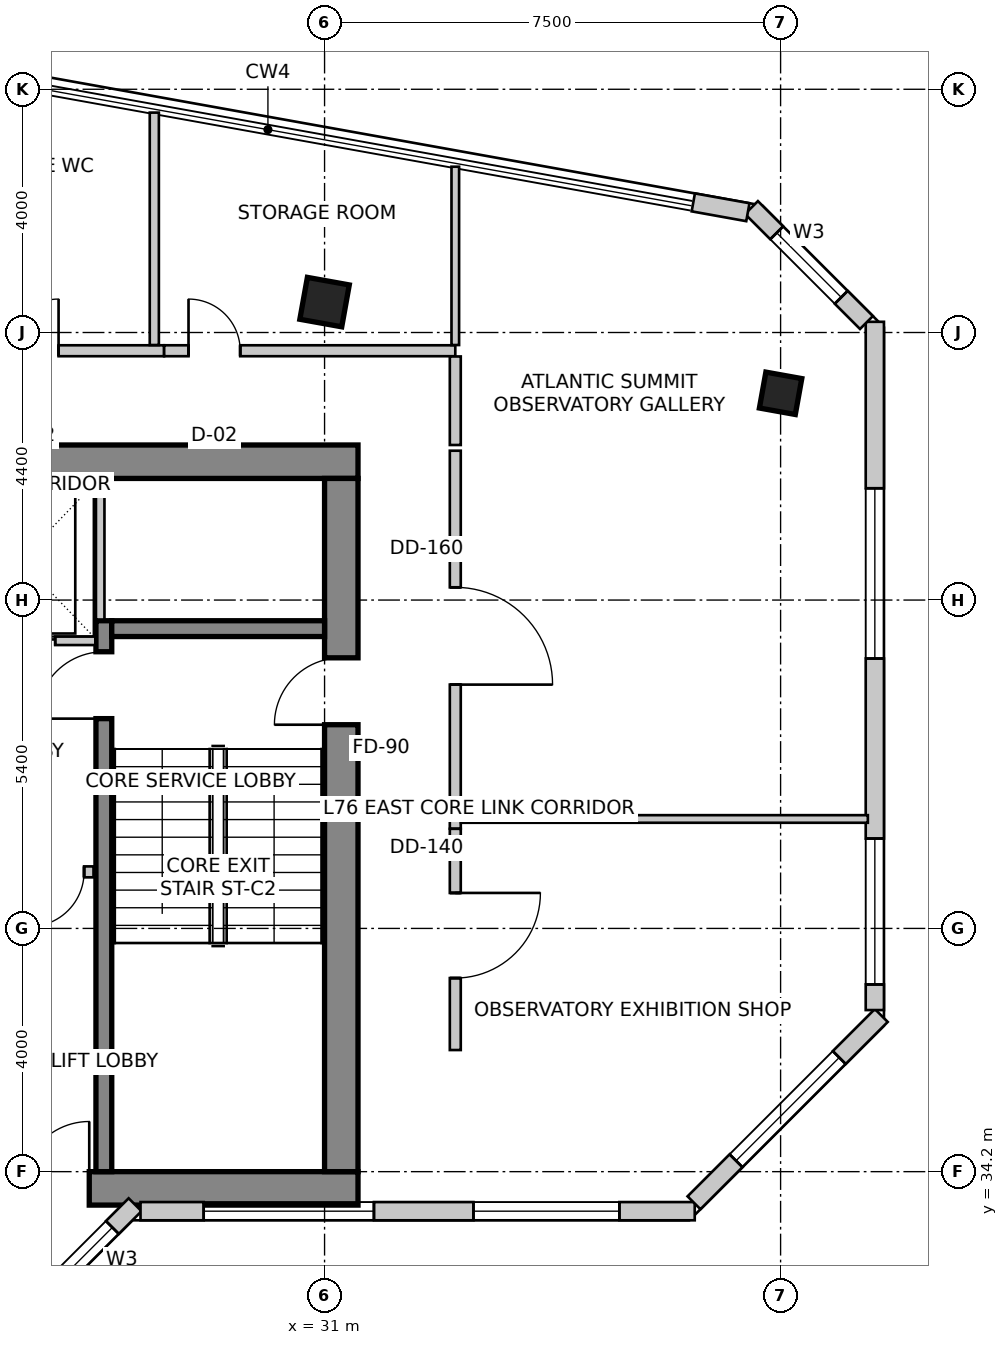
"""IFC4 building model, lengths in metres.
Left out: names, types, materials, properties, quantities, classifications, styles, units other than length and angle.
Written with IfcOpenShell. Run it as: python <this file> out.ifc"""

import sys

from ifc_helpers import new_model, si_unit, direction, frame, frame_2d, origin, origin_2d, place, context, subcontext, project, spatial, rectangle, extrude, source, transform, mapped, element, fill, save


model = new_model("IFC4")
c1 = context("Model", 3, precision=1e-05, world=origin(), true_north=direction((0.0, 1.0)))
c2 = subcontext(c1, "Body", "Model", "MODEL_VIEW")
j1 = project(units=[si_unit("LENGTHUNIT", "METRE"), si_unit("PLANEANGLEUNIT", "RADIAN")], contexts=[c1])
p1 = place(None, origin())
s1 = spatial("IfcSite", under=j1, at=p1, CompositionType="ELEMENT")
p2 = place(p1, origin())
s2 = spatial("IfcBuilding", under=s1, at=p2, CompositionType="ELEMENT")
p3 = place(p2, frame((0.0, 0.0, 296.5)))
s3 = spatial("IfcBuildingStorey", under=s2, at=p3, CompositionType="ELEMENT", Elevation=296.5)
p4 = place(p3, frame((16.05, 45.875, 0.0), z_axis=(0.0, 0.0, 1.0), x_axis=(1.0, 0.0, 0.0)))
e1 = element("IfcWall", 1, at=p4, inside=s3, PredefinedType="SHEAR", context=c2, shape_type="SweptSolid", body=[
    extrude(rectangle(XDim=15.5, YDim=0.55, at=frame_2d((7.75, 0.0))), origin(), (0.0, 0.0, 1.0), 4.0),
])
p5 = place(p3, frame((16.05, 33.925, 0.0), z_axis=(0.0, 0.0, 1.0), x_axis=(1.0, 0.0, 0.0)))
e2 = element("IfcWall", 2, at=p5, inside=s3, PredefinedType="SHEAR", context=c2, shape_type="SweptSolid", body=[
    extrude(rectangle(XDim=15.5, YDim=0.55, at=frame_2d((7.75, 0.0))), origin(), (0.0, 0.0, 1.0), 4.0),
])
m1 = source(origin(), c2, "Body", "SweptSolid", [
    extrude(rectangle(XDim=1.1, YDim=2.15, at=frame_2d((0.55, 1.075))), frame((0.0, 0.285, 0.0), z_axis=(0.0, -1.0, 0.0), x_axis=(1.0, 0.0, 0.0)), (0.0, 0.0, 1.0), 0.57),
])
p6 = place(p5, frame((9.98, 0.0, 0.0)))
e3 = element("IfcOpeningElement", 3, at=p6, cuts=e2, PredefinedType="OPENING", context=c2, shape_type="MappedRepresentation", body=[
    mapped(m1, transform((0.0, 0.0, 0.0), scale=1.0)),
])
p7 = place(p3, frame((31.275, 34.2, 0.0), z_axis=(0.0, 0.0, 1.0), x_axis=(0.0, 1.0, 0.0)))
e4 = element("IfcWall", 4, at=p7, inside=s3, PredefinedType="SHEAR", context=c2, shape_type="SweptSolid", body=[
    extrude(rectangle(XDim=11.4, YDim=0.55, at=frame_2d((5.7, 0.0))), origin(), (0.0, 0.0, 1.0), 4.0),
])
p8 = place(p7, frame((7.35, 0.0, 0.0)))
e5 = element("IfcOpeningElement", 5, at=p8, cuts=e4, PredefinedType="OPENING", context=c2, shape_type="MappedRepresentation", body=[
    mapped(m1, transform((0.0, 0.0, 0.0), scale=1.0)),
])
p9 = place(p3, frame((27.37, 34.2, 0.0), z_axis=(0.0, 0.0, 1.0), x_axis=(0.0, 1.0, 0.0)))
e6 = element("IfcWall", 6, at=p9, inside=s3, PredefinedType="SHEAR", context=c2, shape_type="SweptSolid", body=[
    extrude(rectangle(XDim=9.06, YDim=0.26, at=frame_2d((4.53, 0.0))), origin(), (0.0, 0.0, 1.0), 4.0),
])
m2 = source(origin(), c2, "Body", "SweptSolid", [
    extrude(rectangle(XDim=1.1, YDim=2.15, at=frame_2d((0.55, 1.075))), frame((0.0, 0.14, 0.0), z_axis=(0.0, -1.0, 0.0), x_axis=(1.0, 0.0, 0.0)), (0.0, 0.0, 1.0), 0.28),
])
p10 = place(p9, frame((7.45, 0.0, 0.0)))
e7 = element("IfcOpeningElement", 7, at=p10, cuts=e6, PredefinedType="OPENING", context=c2, shape_type="MappedRepresentation", body=[
    mapped(m2, transform((0.0, 0.0, 0.0), scale=1.0)),
])
p11 = place(p3, frame((27.5, 43.13, 0.0), z_axis=(0.0, 0.0, 1.0), x_axis=(1.0, 0.0, 0.0)))
e8 = element("IfcWall", 8, at=p11, inside=s3, PredefinedType="SHEAR", context=c2, shape_type="SweptSolid", body=[
    extrude(rectangle(XDim=3.5, YDim=0.26, at=frame_2d((1.75, 0.0))), origin(), (0.0, 0.0, 1.0), 4.0),
])
m3 = source(origin(), c2, "Body", "SweptSolid", [
    extrude(rectangle(XDim=0.7, YDim=0.7, at=origin_2d()), origin(), (0.0, 0.0, 1.0), 4.0),
])
p12 = place(p3, frame((31.0, 48.5, 0.0), z_axis=(0.0, 0.0, 1.0), x_axis=(0.984195607969, -0.17708474032, 0.0)))
e9 = element("IfcColumn", 9, at=p12, inside=s3, PredefinedType="COLUMN", context=c2, shape_type="MappedRepresentation", body=[
    mapped(m3, transform((0.0, 0.0, 0.0), scale=1.0)),
])
m4 = source(origin(), c2, "Body", "SweptSolid", [
    extrude(rectangle(XDim=0.6, YDim=0.6, at=origin_2d()), origin(), (0.0, 0.0, 1.0), 4.0),
])
p13 = place(p3, frame((38.5, 47.0, 0.0), z_axis=(0.0, 0.0, 1.0), x_axis=(0.984195607969, -0.17708474032, 0.0)))
e10 = element("IfcColumn", 10, at=p13, inside=s3, PredefinedType="COLUMN", context=c2, shape_type="MappedRepresentation", body=[
    mapped(m4, transform((0.0, 0.0, 0.0), scale=1.0)),
])
p14 = place(p3, frame((25.828, 31.6, 0.0), z_axis=(0.0, 0.0, 1.0), x_axis=(0.707106781187, 0.707106781187, 0.0)))
e11 = element("IfcWall", 11, at=p14, inside=s3, PredefinedType="SOLIDWALL", context=c2, shape_type="SweptSolid", body=[
    extrude(rectangle(XDim=2.907, YDim=0.3, at=frame_2d((1.454, 0.0))), origin(), (0.0, 0.0, 1.0), 3.75),
])
m5 = source(origin(), c2, "Body", "SweptSolid", [
    extrude(rectangle(XDim=1.5, YDim=1.8, at=frame_2d((0.75, 0.9))), frame((0.0, 0.16, 0.0), z_axis=(0.0, -1.0, 0.0), x_axis=(1.0, 0.0, 0.0)), (0.0, 0.0, 1.0), 0.32),
])
p15 = place(p14, frame((0.879, 0.0, 0.85)))
e12 = element("IfcOpeningElement", 12, at=p15, cuts=e11, PredefinedType="OPENING", context=c2, shape_type="MappedRepresentation", body=[
    mapped(m5, transform((0.0, 0.0, 0.0), scale=1.0)),
])
p16 = place(p3, frame((27.973, 33.55, 0.0), z_axis=(0.0, 0.0, 1.0), x_axis=(1.0, 0.0, 0.0)))
e13 = element("IfcWall", 13, at=p16, inside=s3, PredefinedType="SOLIDWALL", context=c2, shape_type="SweptSolid", body=[
    extrude(rectangle(XDim=9.115, YDim=0.3, at=frame_2d((4.558, 0.0))), origin(), (0.0, 0.0, 1.0), 3.75),
])
m6 = source(origin(), c2, "Body", "SweptSolid", [
    extrude(rectangle(XDim=2.8, YDim=2.4, at=frame_2d((1.4, 1.2))), frame((0.0, 0.16, 0.0), z_axis=(0.0, -1.0, 0.0), x_axis=(1.0, 0.0, 0.0)), (0.0, 0.0, 1.0), 0.32),
])
p17 = place(p16, frame((1.039, 0.0, 0.85)))
e14 = element("IfcOpeningElement", 14, at=p17, cuts=e13, PredefinedType="OPENING", context=c2, shape_type="MappedRepresentation", body=[
    mapped(m6, transform((0.0, 0.0, 0.0), scale=1.0)),
])
m7 = source(origin(), c2, "Body", "SweptSolid", [
    extrude(rectangle(XDim=2.4, YDim=2.2, at=frame_2d((1.2, 1.1))), frame((0.0, 0.16, 0.0), z_axis=(0.0, -1.0, 0.0), x_axis=(1.0, 0.0, 0.0)), (0.0, 0.0, 1.0), 0.32),
])
p18 = place(p16, frame((5.476, 0.0, 0.85)))
e15 = element("IfcOpeningElement", 15, at=p18, cuts=e13, PredefinedType="OPENING", context=c2, shape_type="MappedRepresentation", body=[
    mapped(m7, transform((0.0, 0.0, 0.0), scale=1.0)),
])
p19 = place(p3, frame((37.076, 33.688, 0.0), z_axis=(0.0, 0.0, 1.0), x_axis=(0.707078757535, 0.707134803727, 0.0)))
e16 = element("IfcWall", 16, at=p19, inside=s3, PredefinedType="SOLIDWALL", context=c2, shape_type="SweptSolid", body=[
    extrude(rectangle(XDim=4.356, YDim=0.3, at=frame_2d((2.178, 0.0))), origin(), (0.0, 0.0, 1.0), 3.75),
])
p20 = place(p19, frame((0.978, 0.0, 0.85)))
e17 = element("IfcOpeningElement", 17, at=p20, cuts=e16, PredefinedType="OPENING", context=c2, shape_type="MappedRepresentation", body=[
    mapped(m7, transform((0.0, 0.0, 0.0), scale=1.0)),
])
p21 = place(p3, frame((40.05, 36.857, 0.0), z_axis=(0.0, 0.0, 1.0), x_axis=(0.0, 1.0, 0.0)))
e18 = element("IfcWall", 18, at=p21, inside=s3, PredefinedType="SOLIDWALL", context=c2, shape_type="SweptSolid", body=[
    extrude(rectangle(XDim=11.318, YDim=0.3, at=frame_2d((5.659, 0.0))), origin(), (0.0, 0.0, 1.0), 3.75),
])
p22 = place(p21, frame((0.421, 0.0, 0.85)))
e19 = element("IfcOpeningElement", 19, at=p22, cuts=e18, PredefinedType="OPENING", context=c2, shape_type="MappedRepresentation", body=[
    mapped(m7, transform((0.0, 0.0, 0.0), scale=1.0)),
])
p23 = place(p21, frame((5.781, 0.0, 0.85)))
e20 = element("IfcOpeningElement", 20, at=p23, cuts=e18, PredefinedType="OPENING", context=c2, shape_type="MappedRepresentation", body=[
    mapped(m6, transform((0.0, 0.0, 0.0), scale=1.0)),
])
p24 = place(p3, frame((39.912, 48.164, 0.0), z_axis=(0.0, 0.0, 1.0), x_axis=(-0.70715242601, 0.707061133417, 0.0)))
e21 = element("IfcWall", 21, at=p24, inside=s3, PredefinedType="SOLIDWALL", context=c2, shape_type="SweptSolid", body=[
    extrude(rectangle(XDim=2.674, YDim=0.3, at=frame_2d((1.337, 0.0))), origin(), (0.0, 0.0, 1.0), 3.75),
])
p25 = place(p24, frame((0.587, 0.0, 0.85)))
e22 = element("IfcOpeningElement", 22, at=p25, cuts=e21, PredefinedType="OPENING", context=c2, shape_type="MappedRepresentation", body=[
    mapped(m5, transform((0.0, 0.0, 0.0), scale=1.0)),
])
p26 = place(p3, frame((37.962, 49.979, 0.0), z_axis=(0.0, 0.0, 1.0), x_axis=(-0.984215051171, 0.176976645491, 0.0)))
e23 = element("IfcWall", 23, at=p26, inside=s3, PredefinedType="SOLIDWALL", context=c2, shape_type="SweptSolid", body=[
    extrude(rectangle(XDim=0.912, YDim=0.3, at=frame_2d((0.456, 0.0))), origin(), (0.0, 0.0, 1.0), 3.75),
])
p27 = place(p3, frame((20.37, 42.93, 0.0), z_axis=(0.0, 0.0, 1.0), x_axis=(1.0, 0.0, 0.0)))
e24 = element("IfcWall", 24, at=p27, inside=s3, PredefinedType="SOLIDWALL", context=c2, shape_type="SweptSolid", body=[
    extrude(rectangle(XDim=6.86, YDim=0.14, at=frame_2d((3.43, 0.0))), origin(), (0.0, 0.0, 1.0), 3.75),
])
m8 = source(origin(), c2, "Body", "SweptSolid", [
    extrude(rectangle(XDim=1.1, YDim=2.15, at=frame_2d((0.55, 1.075))), frame((0.0, 0.08, 0.0), z_axis=(0.0, -1.0, 0.0), x_axis=(1.0, 0.0, 0.0)), (0.0, 0.0, 1.0), 0.16),
])
p28 = place(p27, frame((0.5, 0.0, 0.0)))
e25 = element("IfcOpeningElement", 25, at=p28, cuts=e24, PredefinedType="OPENING", context=c2, shape_type="MappedRepresentation", body=[
    mapped(m8, transform((0.0, 0.0, 0.0), scale=1.0)),
])
p29 = place(p27, frame((2.7, 0.0, 0.0)))
e26 = element("IfcOpeningElement", 26, at=p29, cuts=e24, PredefinedType="OPENING", context=c2, shape_type="MappedRepresentation", body=[
    mapped(m8, transform((0.0, 0.0, 0.0), scale=1.0)),
])
p30 = place(p27, frame((5.1, 0.0, 0.0)))
e27 = element("IfcOpeningElement", 27, at=p30, cuts=e24, PredefinedType="OPENING", context=c2, shape_type="MappedRepresentation", body=[
    mapped(m8, transform((0.0, 0.0, 0.0), scale=1.0)),
])
p31 = place(p3, frame((27.31, 43.28, 0.0), z_axis=(0.0, 0.0, 1.0), x_axis=(0.0, 1.0, 0.0)))
e28 = element("IfcWall", 28, at=p31, inside=s3, PredefinedType="SOLIDWALL", context=c2, shape_type="SweptSolid", body=[
    extrude(rectangle(XDim=2.3, YDim=0.14, at=frame_2d((1.15, 0.0))), origin(), (0.0, 0.0, 1.0), 3.75),
])
p32 = place(p3, frame((27.2, 39.13, 0.0), z_axis=(0.0, 0.0, 1.0), x_axis=(-1.0, 0.0, 0.0)))
e29 = element("IfcWall", 29, at=p32, inside=s3, PredefinedType="PARTITIONING", context=c2, shape_type="SweptSolid", body=[
    extrude(rectangle(XDim=1.21, YDim=0.18, at=frame_2d((0.605, 0.0))), origin(), (0.0, 0.0, 1.0), 3.75),
])
m9 = source(origin(), c2, "Body", "SweptSolid", [
    extrude(rectangle(XDim=0.9, YDim=2.15, at=frame_2d((0.45, 1.075))), frame((0.0, 0.1, 0.0), z_axis=(0.0, -1.0, 0.0), x_axis=(1.0, 0.0, 0.0)), (0.0, 0.0, 1.0), 0.2),
])
p33 = place(p32, frame((0.155, 0.0, 0.0)))
e30 = element("IfcOpeningElement", 30, at=p33, cuts=e29, PredefinedType="OPENING", context=c2, shape_type="MappedRepresentation", body=[
    mapped(m9, transform((0.0, 0.0, 0.0), scale=1.0)),
])
p34 = place(p3, frame((24.162, 47.7, 0.0), z_axis=(0.0, 0.0, 1.0), x_axis=(1.0, 0.0, 0.0)))
e31 = element("IfcWall", 31, at=p34, inside=s3, PredefinedType="PARTITIONING", context=c2, shape_type="SweptSolid", body=[
    extrude(rectangle(XDim=4.198, YDim=0.18, at=frame_2d((2.099, 0.0))), origin(), (0.0, 0.0, 1.0), 3.75),
])
m10 = source(origin(), c2, "Body", "SweptSolid", [
    extrude(rectangle(XDim=0.85, YDim=2.15, at=frame_2d((0.425, 1.075))), frame((0.0, 0.1, 0.0), z_axis=(0.0, -1.0, 0.0), x_axis=(1.0, 0.0, 0.0)), (0.0, 0.0, 1.0), 0.2),
])
p35 = place(p34, frame((1.613, 0.0, 0.0)))
e32 = element("IfcOpeningElement", 32, at=p35, cuts=e31, PredefinedType="OPENING", context=c2, shape_type="MappedRepresentation", body=[
    mapped(m10, transform((0.0, 0.0, 0.0), scale=1.0)),
])
p36 = place(p3, frame((28.362, 47.7, 0.0), z_axis=(0.0, 0.0, 1.0), x_axis=(1.0, 0.0, 0.0)))
e33 = element("IfcWall", 33, at=p36, inside=s3, PredefinedType="PARTITIONING", context=c2, shape_type="SweptSolid", body=[
    extrude(rectangle(XDim=4.788, YDim=0.18, at=frame_2d((2.394, 0.0))), origin(), (0.0, 0.0, 1.0), 3.279),
])
p37 = place(p36, frame((0.401, 0.0, 0.0)))
e34 = element("IfcOpeningElement", 34, at=p37, cuts=e33, PredefinedType="OPENING", context=c2, shape_type="MappedRepresentation", body=[
    mapped(m10, transform((0.0, 0.0, 0.0), scale=1.0)),
])
p38 = place(p3, frame((33.15, 47.606, 0.0), z_axis=(0.0, 0.0, 1.0), x_axis=(0.0, -1.0, 0.0)))
e35 = element("IfcWall", 35, at=p38, inside=s3, PredefinedType="PARTITIONING", context=c2, shape_type="SweptSolid", body=[
    extrude(rectangle(XDim=1.456, YDim=0.18, at=frame_2d((0.728, 0.0))), origin(), (0.0, 0.0, 1.0), 3.75),
])
p39 = place(p3, frame((33.15, 46.056, 0.0), z_axis=(0.0, 0.0, 1.0), x_axis=(0.0, -1.0, 0.0)))
e36 = element("IfcWall", 36, at=p39, inside=s3, PredefinedType="PARTITIONING", context=c2, shape_type="SweptSolid", body=[
    extrude(rectangle(XDim=6.216, YDim=0.18, at=frame_2d((3.108, 0.0))), origin(), (0.0, 0.0, 1.0), 3.279),
])
m11 = source(origin(), c2, "Body", "SweptSolid", [
    extrude(rectangle(XDim=1.6, YDim=2.15, at=frame_2d((0.8, 1.075))), frame((0.0, 0.1, 0.0), z_axis=(0.0, -1.0, 0.0), x_axis=(1.0, 0.0, 0.0)), (0.0, 0.0, 1.0), 0.2),
])
p40 = place(p39, frame((2.247, 0.0, 0.0)))
e37 = element("IfcOpeningElement", 37, at=p40, cuts=e36, PredefinedType="OPENING", context=c2, shape_type="MappedRepresentation", body=[
    mapped(m11, transform((0.0, 0.0, 0.0), scale=1.0)),
])
p41 = place(p3, frame((33.15, 39.838, 0.0), z_axis=(0.0, 0.0, 1.0), x_axis=(0.0, -1.0, 0.0)))
e38 = element("IfcWall", 38, at=p41, inside=s3, PredefinedType="PARTITIONING", context=c2, shape_type="SweptSolid", body=[
    extrude(rectangle(XDim=3.638, YDim=0.18, at=frame_2d((1.819, 0.0))), origin(), (0.0, 0.0, 1.0), 3.75),
])
m12 = source(origin(), c2, "Body", "SweptSolid", [
    extrude(rectangle(XDim=1.4, YDim=2.15, at=frame_2d((0.7, 1.075))), frame((0.0, 0.1, 0.0), z_axis=(0.0, -1.0, 0.0), x_axis=(1.0, 0.0, 0.0)), (0.0, 0.0, 1.0), 0.2),
])
p42 = place(p41, frame((1.054, 0.0, 0.0)))
e39 = element("IfcOpeningElement", 39, at=p42, cuts=e38, PredefinedType="OPENING", context=c2, shape_type="MappedRepresentation", body=[
    mapped(m12, transform((0.0, 0.0, 0.0), scale=1.0)),
])
p43 = place(p3, frame((28.2, 51.616, 0.0), z_axis=(0.0, 0.0, 1.0), x_axis=(0.0, -1.0, 0.0)))
e40 = element("IfcWall", 40, at=p43, inside=s3, PredefinedType="PARTITIONING", context=c2, shape_type="SweptSolid", body=[
    extrude(rectangle(XDim=3.822, YDim=0.15, at=frame_2d((1.911, 0.0))), origin(), (0.0, 0.0, 1.0), 3.042),
])
p44 = place(p3, frame((33.15, 50.727, 0.0), z_axis=(0.0, 0.0, 1.0), x_axis=(0.0, -1.0, 0.0)))
e41 = element("IfcWall", 41, at=p44, inside=s3, PredefinedType="PARTITIONING", context=c2, shape_type="SweptSolid", body=[
    extrude(rectangle(XDim=2.933, YDim=0.125, at=frame_2d((1.466, 0.0))), origin(), (0.0, 0.0, 1.0), 3.042),
])
p45 = place(p3, frame((39.935, 40.0, 0.0), z_axis=(0.0, 0.0, 1.0), x_axis=(-1.0, 0.0, 0.0)))
e42 = element("IfcWall", 42, at=p45, inside=s3, PredefinedType="PARTITIONING", context=c2, shape_type="SweptSolid", body=[
    extrude(rectangle(XDim=6.691, YDim=0.125, at=frame_2d((3.346, 0.0))), origin(), (0.0, 0.0, 1.0), 3.75),
])
m13 = source(origin(), c2, "Body", "SweptSolid", [
    extrude(rectangle(XDim=1.5, YDim=1.8, at=frame_2d((0.75, 0.9))), frame((0.0, -0.015, 0.0), z_axis=(0.0, -1.0, 0.0), x_axis=(1.0, 0.0, 0.0)), (0.0, 0.0, 1.0), 0.06),
])
p46 = place(p15, origin())
e43 = element("IfcWindow", 43, at=p46, inside=s3, PartitioningType="SINGLE_PANEL", PredefinedType="WINDOW", context=c2, shape_type="MappedRepresentation", body=[
    mapped(m13, transform((0.0, 0.0, 0.0), scale=1.0)),
])
fill(e12, e43)
m14 = source(origin(), c2, "Body", "SweptSolid", [
    extrude(rectangle(XDim=2.8, YDim=2.4, at=frame_2d((1.4, 1.2))), frame((0.0, -0.015, 0.0), z_axis=(0.0, -1.0, 0.0), x_axis=(1.0, 0.0, 0.0)), (0.0, 0.0, 1.0), 0.06),
])
p47 = place(p17, origin())
e44 = element("IfcWindow", 44, at=p47, inside=s3, PartitioningType="SINGLE_PANEL", PredefinedType="WINDOW", context=c2, shape_type="MappedRepresentation", body=[
    mapped(m14, transform((0.0, 0.0, 0.0), scale=1.0)),
])
fill(e14, e44)
m15 = source(origin(), c2, "Body", "SweptSolid", [
    extrude(rectangle(XDim=2.4, YDim=2.2, at=frame_2d((1.2, 1.1))), frame((0.0, -0.015, 0.0), z_axis=(0.0, -1.0, 0.0), x_axis=(1.0, 0.0, 0.0)), (0.0, 0.0, 1.0), 0.06),
])
p48 = place(p18, origin())
e45 = element("IfcWindow", 45, at=p48, inside=s3, PartitioningType="SINGLE_PANEL", PredefinedType="WINDOW", context=c2, shape_type="MappedRepresentation", body=[
    mapped(m15, transform((0.0, 0.0, 0.0), scale=1.0)),
])
fill(e15, e45)
p49 = place(p20, origin())
e46 = element("IfcWindow", 46, at=p49, inside=s3, PartitioningType="SINGLE_PANEL", PredefinedType="WINDOW", context=c2, shape_type="MappedRepresentation", body=[
    mapped(m15, transform((0.0, 0.0, 0.0), scale=1.0)),
])
fill(e17, e46)
p50 = place(p22, origin())
e47 = element("IfcWindow", 47, at=p50, inside=s3, PartitioningType="SINGLE_PANEL", PredefinedType="WINDOW", context=c2, shape_type="MappedRepresentation", body=[
    mapped(m15, transform((0.0, 0.0, 0.0), scale=1.0)),
])
fill(e19, e47)
p51 = place(p23, origin())
e48 = element("IfcWindow", 48, at=p51, inside=s3, PartitioningType="SINGLE_PANEL", PredefinedType="WINDOW", context=c2, shape_type="MappedRepresentation", body=[
    mapped(m14, transform((0.0, 0.0, 0.0), scale=1.0)),
])
fill(e20, e48)
p52 = place(p25, origin())
e49 = element("IfcWindow", 49, at=p52, inside=s3, PartitioningType="SINGLE_PANEL", PredefinedType="WINDOW", context=c2, shape_type="MappedRepresentation", body=[
    mapped(m13, transform((0.0, 0.0, 0.0), scale=1.0)),
])
fill(e22, e49)
m16 = source(origin(), c2, "Body", "SweptSolid", [
    extrude(rectangle(XDim=1.1, YDim=2.15, at=frame_2d((0.55, 1.075))), frame((0.0, 0.025, 0.0), z_axis=(0.0, -1.0, 0.0), x_axis=(1.0, 0.0, 0.0)), (0.0, 0.0, 1.0), 0.05),
])
p53 = place(p30, origin())
e50 = element("IfcDoor", 50, at=p53, inside=s3, OperationType="SLIDING_TO_LEFT", PredefinedType="DOOR", context=c2, shape_type="MappedRepresentation", body=[
    mapped(m16, transform((0.0, 0.0, 0.0), scale=1.0)),
])
fill(e27, e50)
m17 = source(origin(), c2, "Body", "SweptSolid", [
    extrude(rectangle(XDim=1.1, YDim=2.15, at=frame_2d((0.55, 1.075))), frame((0.0, 0.025, 0.0), z_axis=(0.0, -1.0, 0.0), x_axis=(1.0, 0.0, 0.0)), (0.0, 0.0, 1.0), 0.05),
])
p54 = place(p10, origin())
e51 = element("IfcDoor", 51, at=p54, inside=s3, OperationType="SINGLE_SWING_LEFT", PredefinedType="DOOR", context=c2, shape_type="MappedRepresentation", body=[
    mapped(m17, transform((0.0, 0.0, 0.0), scale=1.0)),
])
fill(e7, e51)
p55 = place(p8, origin())
e52 = element("IfcDoor", 52, at=p55, inside=s3, OperationType="SINGLE_SWING_LEFT", PredefinedType="DOOR", context=c2, shape_type="MappedRepresentation", body=[
    mapped(m17, transform((0.0, 0.0, 0.0), scale=1.0)),
])
fill(e5, e52)
p56 = place(p6, origin())
e53 = element("IfcDoor", 53, at=p56, inside=s3, OperationType="SINGLE_SWING_RIGHT", PredefinedType="DOOR", context=c2, shape_type="MappedRepresentation", body=[
    mapped(m17, transform((0.0, 0.0, 0.0), scale=1.0)),
])
fill(e3, e53)
m18 = source(origin(), c2, "Body", "SweptSolid", [
    extrude(rectangle(XDim=0.9, YDim=2.15, at=frame_2d((0.45, 1.075))), frame((0.0, 0.025, 0.0), z_axis=(0.0, -1.0, 0.0), x_axis=(1.0, 0.0, 0.0)), (0.0, 0.0, 1.0), 0.05),
])
p57 = place(p33, origin())
e54 = element("IfcDoor", 54, at=p57, inside=s3, OperationType="SINGLE_SWING_RIGHT", PredefinedType="DOOR", context=c2, shape_type="MappedRepresentation", body=[
    mapped(m18, transform((0.0, 0.0, 0.0), scale=1.0)),
])
fill(e30, e54)
m19 = source(origin(), c2, "Body", "SweptSolid", [
    extrude(rectangle(XDim=0.85, YDim=2.15, at=frame_2d((0.425, 1.075))), frame((0.0, 0.025, 0.0), z_axis=(0.0, -1.0, 0.0), x_axis=(1.0, 0.0, 0.0)), (0.0, 0.0, 1.0), 0.05),
])
p58 = place(p35, origin())
e55 = element("IfcDoor", 55, at=p58, inside=s3, OperationType="SINGLE_SWING_RIGHT", PredefinedType="DOOR", context=c2, shape_type="MappedRepresentation", body=[
    mapped(m19, transform((0.0, 0.0, 0.0), scale=1.0)),
])
fill(e32, e55)
p59 = place(p37, origin())
e56 = element("IfcDoor", 56, at=p59, inside=s3, OperationType="SINGLE_SWING_LEFT", PredefinedType="DOOR", context=c2, shape_type="MappedRepresentation", body=[
    mapped(m19, transform((0.0, 0.0, 0.0), scale=1.0)),
])
fill(e34, e56)
m20 = source(origin(), c2, "Body", "SweptSolid", [
    extrude(rectangle(XDim=1.6, YDim=2.15, at=frame_2d((0.8, 1.075))), frame((0.0, 0.025, 0.0), z_axis=(0.0, -1.0, 0.0), x_axis=(1.0, 0.0, 0.0)), (0.0, 0.0, 1.0), 0.05),
])
p60 = place(p40, origin())
e57 = element("IfcDoor", 57, at=p60, inside=s3, OperationType="SINGLE_SWING_RIGHT", PredefinedType="DOOR", context=c2, shape_type="MappedRepresentation", body=[
    mapped(m20, transform((0.0, 0.0, 0.0), scale=1.0)),
])
fill(e37, e57)
m21 = source(origin(), c2, "Body", "SweptSolid", [
    extrude(rectangle(XDim=1.4, YDim=2.15, at=frame_2d((0.7, 1.075))), frame((0.0, 0.025, 0.0), z_axis=(0.0, -1.0, 0.0), x_axis=(1.0, 0.0, 0.0)), (0.0, 0.0, 1.0), 0.05),
])
p61 = place(p42, origin())
e58 = element("IfcDoor", 58, at=p61, inside=s3, OperationType="SINGLE_SWING_LEFT", PredefinedType="DOOR", context=c2, shape_type="MappedRepresentation", body=[
    mapped(m21, transform((0.0, 0.0, 0.0), scale=1.0)),
])
fill(e39, e58)
save(model, sys.argv[1])
